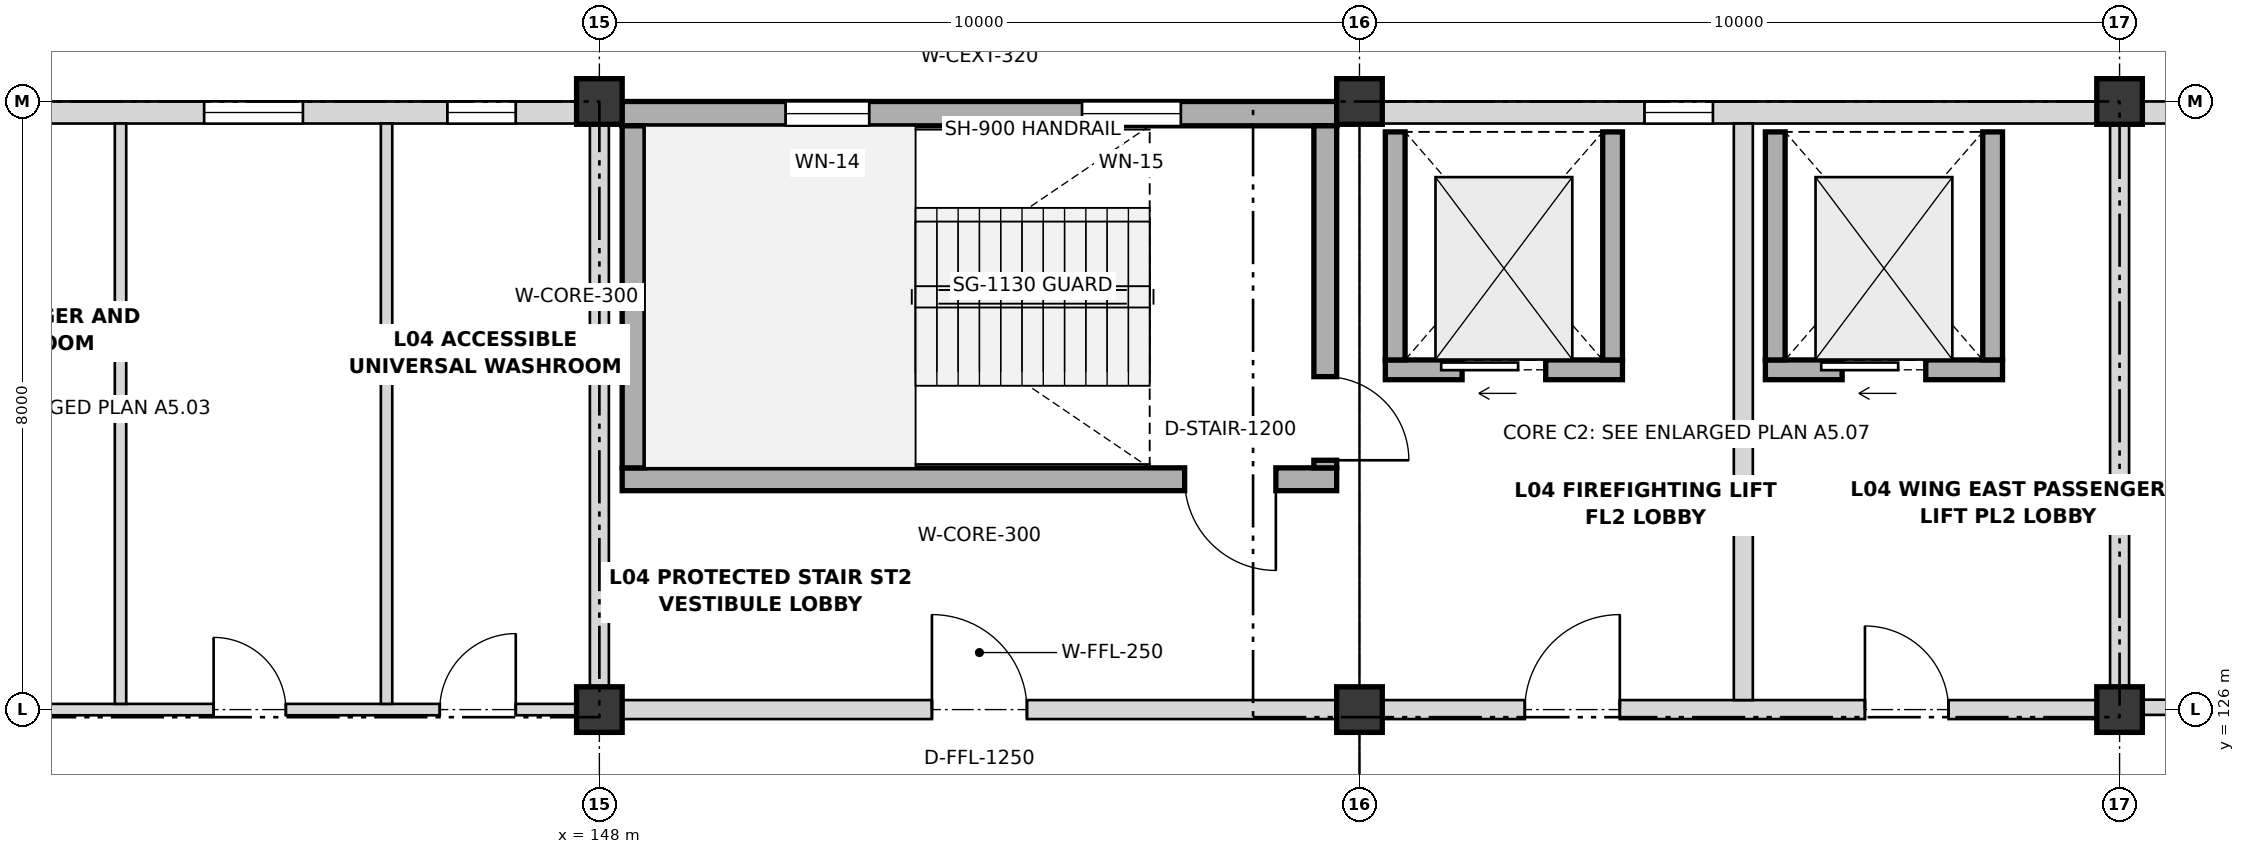
"""IFC4 building model, lengths in metres.
Left out: names, types, materials, properties, quantities, classifications, styles, units other than length and angle.
Written with IfcOpenShell. Run it as: python <this file> out.ifc"""

import sys

from ifc_helpers import new_model, si_unit, direction, frame, frame_2d, origin, origin_2d, place, context, subcontext, project, spatial, rectangle, extrude, element, fill, save


model = new_model("IFC4")
c1 = context("Model", 3, precision=1e-05, world=origin(), true_north=direction((0.0, 1.0)))
c2 = subcontext(c1, "Body", "Model", "MODEL_VIEW")
j1 = project(units=[si_unit("LENGTHUNIT", "METRE"), si_unit("PLANEANGLEUNIT", "RADIAN")], contexts=[c1])
p1 = place(None, origin())
s1 = spatial("IfcSite", under=j1, at=p1, CompositionType="ELEMENT")
p2 = place(p1, origin())
s2 = spatial("IfcBuilding", under=s1, at=p2, CompositionType="ELEMENT")
p3 = place(p2, frame((0.0, 0.0, 18.6)))
s3 = spatial("IfcBuildingStorey", under=s2, at=p3, CompositionType="ELEMENT", Elevation=18.6)
for number, where, z_axis, x_axis in (
    (1, (148.0, 126.0, 0.0), (0.0, 0.0, 1.0), (1.0, 0.0, 0.0)),
    (2, (148.0, 134.0, 0.0), (0.0, 0.0, 1.0), (1.0, 0.0, 0.0)),
    (3, (158.0, 126.0, 0.0), (0.0, 0.0, 1.0), (1.0, 0.0, 0.0)),
    (4, (158.0, 134.0, 0.0), (0.0, 0.0, 1.0), (1.0, 0.0, 0.0)),
    (5, (168.0, 126.0, 0.0), (0.0, 0.0, 1.0), (1.0, 0.0, 0.0)),
    (6, (168.0, 134.0, 0.0), (0.0, 0.0, 1.0), (1.0, 0.0, 0.0)),
):
    element("IfcColumn", number, at=place(p3, frame(where, z_axis=z_axis, x_axis=x_axis)), inside=s3, PredefinedType="COLUMN", context=c2, shape_type="SweptSolid", body=[
        extrude(rectangle(XDim=0.6, YDim=0.6, at=origin_2d()), origin(), (0.0, 0.0, 1.0), 4.2),
    ])
p4 = place(p3, frame((138.295, 133.855, 0.0), z_axis=(0.0, 0.0, 1.0), x_axis=(1.0, 0.0, 0.0)))
e7 = element("IfcWall", 7, at=p4, inside=s3, PredefinedType="SOLIDWALL", context=c2, shape_type="SweptSolid", body=[
    extrude(rectangle(XDim=9.41, YDim=0.29, at=frame_2d((4.705, 0.0))), origin(), (0.0, 0.0, 1.0), 3.188),
])
p5 = place(p4, frame((1.205, 0.0, 1.25)))
e8 = element("IfcOpeningElement", 8, at=p5, cuts=e7, PredefinedType="OPENING", context=c2, shape_type="SweptSolid", body=[
    extrude(rectangle(XDim=1.1, YDim=1.15, at=frame_2d((0.55, 0.575))), frame((0.0, 0.155, 0.0), z_axis=(0.0, -1.0, 0.0), x_axis=(1.0, 0.0, 0.0)), (0.0, 0.0, 1.0), 0.31),
])
p6 = place(p4, frame((4.505, 0.0, 1.25)))
e9 = element("IfcOpeningElement", 9, at=p6, cuts=e7, PredefinedType="OPENING", context=c2, shape_type="SweptSolid", body=[
    extrude(rectangle(XDim=1.3, YDim=1.15, at=frame_2d((0.65, 0.575))), frame((0.0, 0.155, 0.0), z_axis=(0.0, -1.0, 0.0), x_axis=(1.0, 0.0, 0.0)), (0.0, 0.0, 1.0), 0.31),
])
p7 = place(p4, frame((7.705, 0.0, 1.25)))
e10 = element("IfcOpeningElement", 10, at=p7, cuts=e7, PredefinedType="OPENING", context=c2, shape_type="SweptSolid", body=[
    extrude(rectangle(XDim=0.9, YDim=1.4, at=frame_2d((0.45, 0.7))), frame((0.0, 0.155, 0.0), z_axis=(0.0, -1.0, 0.0), x_axis=(1.0, 0.0, 0.0)), (0.0, 0.0, 1.0), 0.31),
])
p8 = place(p3, frame((148.295, 133.84, 0.0), z_axis=(0.0, 0.0, 1.0), x_axis=(1.0, 0.0, 0.0)))
e11 = element("IfcWall", 11, at=p8, inside=s3, PredefinedType="SHEAR", context=c2, shape_type="SweptSolid", body=[
    extrude(rectangle(XDim=9.41, YDim=0.32, at=frame_2d((4.705, 0.0))), origin(), (0.0, 0.0, 1.0), 4.2),
])
p9 = place(p8, frame((2.155, 0.0, 1.05)))
e12 = element("IfcOpeningElement", 12, at=p9, cuts=e11, PredefinedType="OPENING", context=c2, shape_type="SweptSolid", body=[
    extrude(rectangle(XDim=1.1, YDim=1.4, at=frame_2d((0.55, 0.7))), frame((0.0, 0.17, 0.0), z_axis=(0.0, -1.0, 0.0), x_axis=(1.0, 0.0, 0.0)), (0.0, 0.0, 1.0), 0.34),
])
p10 = place(p8, frame((6.055, 0.0, 1.05)))
e13 = element("IfcOpeningElement", 13, at=p10, cuts=e11, PredefinedType="OPENING", context=c2, shape_type="SweptSolid", body=[
    extrude(rectangle(XDim=1.3, YDim=1.4, at=frame_2d((0.65, 0.7))), frame((0.0, 0.17, 0.0), z_axis=(0.0, -1.0, 0.0), x_axis=(1.0, 0.0, 0.0)), (0.0, 0.0, 1.0), 0.34),
])
p11 = place(p3, frame((158.295, 133.855, 0.0), z_axis=(0.0, 0.0, 1.0), x_axis=(1.0, 0.0, 0.0)))
e14 = element("IfcWall", 14, at=p11, inside=s3, PredefinedType="SOLIDWALL", context=c2, shape_type="SweptSolid", body=[
    extrude(rectangle(XDim=9.41, YDim=0.29, at=frame_2d((4.705, 0.0))), origin(), (0.0, 0.0, 1.0), 3.188),
])
p12 = place(p11, frame((3.455, 0.0, 1.05)))
e15 = element("IfcOpeningElement", 15, at=p12, cuts=e14, PredefinedType="OPENING", context=c2, shape_type="SweptSolid", body=[
    extrude(rectangle(XDim=0.9, YDim=1.15, at=frame_2d((0.45, 0.575))), frame((0.0, 0.155, 0.0), z_axis=(0.0, -1.0, 0.0), x_axis=(1.0, 0.0, 0.0)), (0.0, 0.0, 1.0), 0.31),
])
p13 = place(p3, frame((168.295, 133.855, 0.0), z_axis=(0.0, 0.0, 1.0), x_axis=(1.0, 0.0, 0.0)))
e16 = element("IfcWall", 16, at=p13, inside=s3, PredefinedType="SOLIDWALL", context=c2, shape_type="SweptSolid", body=[
    extrude(rectangle(XDim=9.41, YDim=0.29, at=frame_2d((4.705, 0.0))), origin(), (0.0, 0.0, 1.0), 3.188),
])
p14 = place(p13, frame((1.855, 0.0, 1.05)))
e17 = element("IfcOpeningElement", 17, at=p14, cuts=e16, PredefinedType="OPENING", context=c2, shape_type="SweptSolid", body=[
    extrude(rectangle(XDim=1.1, YDim=1.15, at=frame_2d((0.55, 0.575))), frame((0.0, 0.155, 0.0), z_axis=(0.0, -1.0, 0.0), x_axis=(1.0, 0.0, 0.0)), (0.0, 0.0, 1.0), 0.31),
])
p15 = place(p13, frame((6.355, 0.0, 1.05)))
e18 = element("IfcOpeningElement", 18, at=p15, cuts=e16, PredefinedType="OPENING", context=c2, shape_type="SweptSolid", body=[
    extrude(rectangle(XDim=1.3, YDim=1.15, at=frame_2d((0.65, 0.575))), frame((0.0, 0.155, 0.0), z_axis=(0.0, -1.0, 0.0), x_axis=(1.0, 0.0, 0.0)), (0.0, 0.0, 1.0), 0.31),
])
p16 = place(p3, frame((157.7, 129.03, 0.0), z_axis=(0.0, 0.0, 1.0), x_axis=(-1.0, 0.0, 0.0)))
e19 = element("IfcWall", 19, at=p16, inside=s3, PredefinedType="SHEAR", context=c2, shape_type="SweptSolid", body=[
    extrude(rectangle(XDim=9.4, YDim=0.3, at=frame_2d((4.7, 0.0))), origin(), (0.0, 0.0, 1.0), 4.2),
])
p17 = place(p16, frame((0.8, 0.0, 0.0)))
e20 = element("IfcOpeningElement", 20, at=p17, cuts=e19, PredefinedType="OPENING", context=c2, shape_type="SweptSolid", body=[
    extrude(rectangle(XDim=1.2, YDim=2.15, at=frame_2d((0.6, 1.075))), frame((0.0, 0.16, 0.0), z_axis=(0.0, -1.0, 0.0), x_axis=(1.0, 0.0, 0.0)), (0.0, 0.0, 1.0), 0.32),
])
p18 = place(p3, frame((157.55, 133.68, 0.0), z_axis=(0.0, 0.0, 1.0), x_axis=(0.0, -1.0, 0.0)))
e21 = element("IfcWall", 21, at=p18, inside=s3, PredefinedType="SHEAR", context=c2, shape_type="SweptSolid", body=[
    extrude(rectangle(XDim=4.5, YDim=0.3, at=frame_2d((2.25, 0.0))), origin(), (0.0, 0.0, 1.0), 4.2),
])
p19 = place(p18, frame((3.3, 0.0, 0.0)))
e22 = element("IfcOpeningElement", 22, at=p19, cuts=e21, PredefinedType="OPENING", context=c2, shape_type="SweptSolid", body=[
    extrude(rectangle(XDim=1.1, YDim=2.15, at=frame_2d((0.55, 1.075))), frame((0.0, 0.16, 0.0), z_axis=(0.0, -1.0, 0.0), x_axis=(1.0, 0.0, 0.0)), (0.0, 0.0, 1.0), 0.32),
])
p20 = place(p3, frame((148.45, 129.18, 0.0), z_axis=(0.0, 0.0, 1.0), x_axis=(0.0, 1.0, 0.0)))
e23 = element("IfcWall", 23, at=p20, inside=s3, PredefinedType="SHEAR", context=c2, shape_type="SweptSolid", body=[
    extrude(rectangle(XDim=4.5, YDim=0.3, at=frame_2d((2.25, 0.0))), origin(), (0.0, 0.0, 1.0), 4.2),
])
p21 = place(p3, frame((158.34, 130.47, 0.0), z_axis=(0.0, 0.0, 1.0), x_axis=(1.0, 0.0, 0.0)))
e24 = element("IfcWall", 24, at=p21, inside=s3, PredefinedType="SHEAR", context=c2, shape_type="SweptSolid", body=[
    extrude(rectangle(XDim=3.12, YDim=0.26, at=frame_2d((1.56, 0.0))), origin(), (0.0, 0.0, 1.0), 4.2),
])
p22 = place(p21, frame((1.01, 0.0, 0.0)))
e25 = element("IfcOpeningElement", 25, at=p22, cuts=e24, PredefinedType="OPENING", context=c2, shape_type="SweptSolid", body=[
    extrude(rectangle(XDim=1.1, YDim=2.1, at=frame_2d((0.55, 1.05))), frame((0.0, 0.14, 0.0), z_axis=(0.0, -1.0, 0.0), x_axis=(1.0, 0.0, 0.0)), (0.0, 0.0, 1.0), 0.28),
])
for number, where, z_axis, x_axis in (
    (26, (158.47, 130.6, 0.0), (0.0, 0.0, 1.0), (0.0, 1.0, 0.0)),
    (27, (161.33, 130.6, 0.0), (0.0, 0.0, 1.0), (0.0, 1.0, 0.0)),
):
    element("IfcWall", number, at=place(p3, frame(where, z_axis=z_axis, x_axis=x_axis)), inside=s3, PredefinedType="SHEAR", context=c2, shape_type="SweptSolid", body=[
        extrude(rectangle(XDim=3.0, YDim=0.26, at=frame_2d((1.5, 0.0))), origin(), (0.0, 0.0, 1.0), 4.2),
    ])
p23 = place(p3, frame((163.34, 130.47, 0.0), z_axis=(0.0, 0.0, 1.0), x_axis=(1.0, 0.0, 0.0)))
e28 = element("IfcWall", 28, at=p23, inside=s3, PredefinedType="SHEAR", context=c2, shape_type="SweptSolid", body=[
    extrude(rectangle(XDim=3.12, YDim=0.26, at=frame_2d((1.56, 0.0))), origin(), (0.0, 0.0, 1.0), 4.2),
])
p24 = place(p23, frame((1.01, 0.0, 0.0)))
e29 = element("IfcOpeningElement", 29, at=p24, cuts=e28, PredefinedType="OPENING", context=c2, shape_type="SweptSolid", body=[
    extrude(rectangle(XDim=1.1, YDim=2.15, at=frame_2d((0.55, 1.075))), frame((0.0, 0.14, 0.0), z_axis=(0.0, -1.0, 0.0), x_axis=(1.0, 0.0, 0.0)), (0.0, 0.0, 1.0), 0.28),
])
for number, where, z_axis, x_axis in (
    (30, (163.47, 130.6, 0.0), (0.0, 0.0, 1.0), (0.0, 1.0, 0.0)),
    (31, (166.33, 130.6, 0.0), (0.0, 0.0, 1.0), (0.0, 1.0, 0.0)),
):
    element("IfcWall", number, at=place(p3, frame(where, z_axis=z_axis, x_axis=x_axis)), inside=s3, PredefinedType="SHEAR", context=c2, shape_type="SweptSolid", body=[
        extrude(rectangle(XDim=3.0, YDim=0.26, at=frame_2d((1.5, 0.0))), origin(), (0.0, 0.0, 1.0), 4.2),
    ])
p25 = place(p3, frame((138.305, 126.0, 0.0), z_axis=(0.0, 0.0, 1.0), x_axis=(1.0, 0.0, 0.0)))
e32 = element("IfcWall", 32, at=p25, inside=s3, PredefinedType="PARTITIONING", context=c2, shape_type="SweptSolid", body=[
    extrude(rectangle(XDim=9.39, YDim=0.15, at=frame_2d((4.695, 0.0))), origin(), (0.0, 0.0, 1.0), 3.188),
])
p26 = place(p25, frame((1.245, 0.0, 0.0)))
e33 = element("IfcOpeningElement", 33, at=p26, cuts=e32, PredefinedType="OPENING", context=c2, shape_type="SweptSolid", body=[
    extrude(rectangle(XDim=0.9, YDim=2.05, at=frame_2d((0.45, 1.025))), frame((0.0, 0.085, 0.0), z_axis=(0.0, -1.0, 0.0), x_axis=(1.0, 0.0, 0.0)), (0.0, 0.0, 1.0), 0.17),
])
p27 = place(p25, frame((4.62, 0.0, 0.0)))
e34 = element("IfcOpeningElement", 34, at=p27, cuts=e32, PredefinedType="OPENING", context=c2, shape_type="SweptSolid", body=[
    extrude(rectangle(XDim=0.95, YDim=2.05, at=frame_2d((0.475, 1.025))), frame((0.0, 0.085, 0.0), z_axis=(0.0, -1.0, 0.0), x_axis=(1.0, 0.0, 0.0)), (0.0, 0.0, 1.0), 0.17),
])
p28 = place(p25, frame((7.595, 0.0, 0.0)))
e35 = element("IfcOpeningElement", 35, at=p28, cuts=e32, PredefinedType="OPENING", context=c2, shape_type="SweptSolid", body=[
    extrude(rectangle(XDim=1.0, YDim=2.05, at=frame_2d((0.5, 1.025))), frame((0.0, 0.085, 0.0), z_axis=(0.0, -1.0, 0.0), x_axis=(1.0, 0.0, 0.0)), (0.0, 0.0, 1.0), 0.17),
])
p29 = place(p3, frame((148.305, 126.0, 0.0), z_axis=(0.0, 0.0, 1.0), x_axis=(1.0, 0.0, 0.0)))
e36 = element("IfcWall", 36, at=p29, inside=s3, PredefinedType="PARTITIONING", context=c2, shape_type="SweptSolid", body=[
    extrude(rectangle(XDim=9.39, YDim=0.25, at=frame_2d((4.695, 0.0))), origin(), (0.0, 0.0, 1.0), 3.188),
])
p30 = place(p29, frame((4.07, 0.0, 0.0)))
e37 = element("IfcOpeningElement", 37, at=p30, cuts=e36, PredefinedType="OPENING", context=c2, shape_type="SweptSolid", body=[
    extrude(rectangle(XDim=1.25, YDim=2.15, at=frame_2d((0.625, 1.075))), frame((0.0, 0.135, 0.0), z_axis=(0.0, -1.0, 0.0), x_axis=(1.0, 0.0, 0.0)), (0.0, 0.0, 1.0), 0.27),
])
p31 = place(p3, frame((158.305, 126.0, 0.0), z_axis=(0.0, 0.0, 1.0), x_axis=(1.0, 0.0, 0.0)))
e38 = element("IfcWall", 38, at=p31, inside=s3, PredefinedType="PARTITIONING", context=c2, shape_type="SweptSolid", body=[
    extrude(rectangle(XDim=9.39, YDim=0.25, at=frame_2d((4.695, 0.0))), origin(), (0.0, 0.0, 1.0), 3.188),
])
p32 = place(p31, frame((1.87, 0.0, 0.0)))
e39 = element("IfcOpeningElement", 39, at=p32, cuts=e38, PredefinedType="OPENING", context=c2, shape_type="SweptSolid", body=[
    extrude(rectangle(XDim=1.25, YDim=2.15, at=frame_2d((0.625, 1.075))), frame((0.0, 0.135, 0.0), z_axis=(0.0, -1.0, 0.0), x_axis=(1.0, 0.0, 0.0)), (0.0, 0.0, 1.0), 0.27),
])
p33 = place(p31, frame((6.345, 0.0, 0.0)))
e40 = element("IfcOpeningElement", 40, at=p33, cuts=e38, PredefinedType="OPENING", context=c2, shape_type="SweptSolid", body=[
    extrude(rectangle(XDim=1.1, YDim=2.15, at=frame_2d((0.55, 1.075))), frame((0.0, 0.135, 0.0), z_axis=(0.0, -1.0, 0.0), x_axis=(1.0, 0.0, 0.0)), (0.0, 0.0, 1.0), 0.27),
])
p34 = place(p3, frame((163.05, 126.125, 0.0), z_axis=(0.0, 0.0, 1.0), x_axis=(0.0, 1.0, 0.0)))
e41 = element("IfcWall", 41, at=p34, inside=s3, PredefinedType="PARTITIONING", context=c2, shape_type="SweptSolid", body=[
    extrude(rectangle(XDim=7.585, YDim=0.25, at=frame_2d((3.792, 0.0))), origin(), (0.0, 0.0, 1.0), 3.188),
])
for number, where, z_axis, x_axis in (
    (42, (141.7, 126.075, 0.0), (0.0, 0.0, 1.0), (0.0, 1.0, 0.0)),
    (43, (145.2, 126.075, 0.0), (0.0, 0.0, 1.0), (0.0, 1.0, 0.0)),
):
    element("IfcWall", number, at=place(p3, frame(where, z_axis=z_axis, x_axis=x_axis)), inside=s3, PredefinedType="PARTITIONING", context=c2, shape_type="SweptSolid", body=[
        extrude(rectangle(XDim=7.635, YDim=0.15, at=frame_2d((3.817, 0.0))), origin(), (0.0, 0.0, 1.0), 3.188),
    ])
for number, where, z_axis, x_axis in (
    (44, (148.0, 126.305, 0.0), (0.0, 0.0, 1.0), (0.0, 1.0, 0.0)),
    (45, (168.0, 126.305, 0.0), (0.0, 0.0, 1.0), (0.0, 1.0, 0.0)),
):
    element("IfcWall", number, at=place(p3, frame(where, z_axis=z_axis, x_axis=x_axis)), inside=s3, PredefinedType="PARTITIONING", context=c2, shape_type="SweptSolid", body=[
        extrude(rectangle(XDim=7.39, YDim=0.25, at=frame_2d((3.695, 0.0))), origin(), (0.0, 0.0, 1.0), 3.188),
    ])
p35 = place(p3, frame((168.3, 126.03, 0.0), z_axis=(0.0, 0.0, 1.0), x_axis=(1.0, 0.0, 0.0)))
e46 = element("IfcWall", 46, at=p35, inside=s3, PredefinedType="PARTITIONING", context=c2, shape_type="SweptSolid", body=[
    extrude(rectangle(XDim=9.4, YDim=0.2, at=frame_2d((4.7, 0.0))), origin(), (0.0, 0.0, 1.0), 3.188),
])
p36 = place(p35, frame((4.2, 0.0, 0.0)))
e47 = element("IfcOpeningElement", 47, at=p36, cuts=e46, PredefinedType="OPENING", context=c2, shape_type="SweptSolid", body=[
    extrude(rectangle(XDim=1.0, YDim=2.2, at=frame_2d((0.5, 1.1))), frame((0.0, 0.11, 0.0), z_axis=(0.0, -1.0, 0.0), x_axis=(1.0, 0.0, 0.0)), (0.0, 0.0, 1.0), 0.22),
])
p37 = place(p6, origin())
e48 = element("IfcWindow", 48, at=p37, inside=s3, PartitioningType="SINGLE_PANEL", PredefinedType="WINDOW", context=c2, shape_type="SweptSolid", body=[
    extrude(rectangle(XDim=1.3, YDim=1.15, at=frame_2d((0.65, 0.575))), frame((0.0, 0.03, 0.0), z_axis=(0.0, -1.0, 0.0), x_axis=(1.0, 0.0, 0.0)), (0.0, 0.0, 1.0), 0.06),
])
fill(e9, e48)
p38 = place(p7, origin())
e49 = element("IfcWindow", 49, at=p38, inside=s3, PartitioningType="SINGLE_PANEL", PredefinedType="WINDOW", context=c2, shape_type="SweptSolid", body=[
    extrude(rectangle(XDim=0.9, YDim=1.4, at=frame_2d((0.45, 0.7))), frame((0.0, 0.03, 0.0), z_axis=(0.0, -1.0, 0.0), x_axis=(1.0, 0.0, 0.0)), (0.0, 0.0, 1.0), 0.06),
])
fill(e10, e49)
p39 = place(p9, origin())
e50 = element("IfcWindow", 50, at=p39, inside=s3, PartitioningType="SINGLE_PANEL", PredefinedType="WINDOW", context=c2, shape_type="SweptSolid", body=[
    extrude(rectangle(XDim=1.1, YDim=1.4, at=frame_2d((0.55, 0.7))), frame((0.0, 0.03, 0.0), z_axis=(0.0, -1.0, 0.0), x_axis=(1.0, 0.0, 0.0)), (0.0, 0.0, 1.0), 0.06),
])
fill(e12, e50)
p40 = place(p10, origin())
e51 = element("IfcWindow", 51, at=p40, inside=s3, PartitioningType="SINGLE_PANEL", PredefinedType="WINDOW", context=c2, shape_type="SweptSolid", body=[
    extrude(rectangle(XDim=1.3, YDim=1.4, at=frame_2d((0.65, 0.7))), frame((0.0, 0.03, 0.0), z_axis=(0.0, -1.0, 0.0), x_axis=(1.0, 0.0, 0.0)), (0.0, 0.0, 1.0), 0.06),
])
fill(e13, e51)
p41 = place(p12, origin())
e52 = element("IfcWindow", 52, at=p41, inside=s3, PartitioningType="SINGLE_PANEL", PredefinedType="WINDOW", context=c2, shape_type="SweptSolid", body=[
    extrude(rectangle(XDim=0.9, YDim=1.15, at=frame_2d((0.45, 0.575))), frame((0.0, 0.03, 0.0), z_axis=(0.0, -1.0, 0.0), x_axis=(1.0, 0.0, 0.0)), (0.0, 0.0, 1.0), 0.06),
])
fill(e15, e52)
p42 = place(p17, origin())
e53 = element("IfcDoor", 53, at=p42, inside=s3, OperationType="SINGLE_SWING_LEFT", PredefinedType="DOOR", context=c2, shape_type="SweptSolid", body=[
    extrude(rectangle(XDim=1.2, YDim=2.15, at=frame_2d((0.6, 1.075))), frame((0.0, 0.025, 0.0), z_axis=(0.0, -1.0, 0.0), x_axis=(1.0, 0.0, 0.0)), (0.0, 0.0, 1.0), 0.05),
])
fill(e20, e53)
p43 = place(p19, origin())
e54 = element("IfcDoor", 54, at=p43, inside=s3, OperationType="SINGLE_SWING_RIGHT", PredefinedType="DOOR", context=c2, shape_type="SweptSolid", body=[
    extrude(rectangle(XDim=1.1, YDim=2.15, at=frame_2d((0.55, 1.075))), frame((0.0, 0.025, 0.0), z_axis=(0.0, -1.0, 0.0), x_axis=(1.0, 0.0, 0.0)), (0.0, 0.0, 1.0), 0.05),
])
fill(e22, e54)
p44 = place(p22, origin())
e55 = element("IfcDoor", 55, at=p44, inside=s3, OperationType="SLIDING_TO_LEFT", PredefinedType="DOOR", context=c2, shape_type="SweptSolid", body=[
    extrude(rectangle(XDim=1.1, YDim=2.1, at=frame_2d((0.55, 1.05))), frame((0.0, 0.025, 0.0), z_axis=(0.0, -1.0, 0.0), x_axis=(1.0, 0.0, 0.0)), (0.0, 0.0, 1.0), 0.05),
])
fill(e25, e55)
p45 = place(p24, origin())
e56 = element("IfcDoor", 56, at=p45, inside=s3, OperationType="SLIDING_TO_LEFT", PredefinedType="DOOR", context=c2, shape_type="SweptSolid", body=[
    extrude(rectangle(XDim=1.1, YDim=2.15, at=frame_2d((0.55, 1.075))), frame((0.0, 0.025, 0.0), z_axis=(0.0, -1.0, 0.0), x_axis=(1.0, 0.0, 0.0)), (0.0, 0.0, 1.0), 0.05),
])
fill(e29, e56)
p46 = place(p27, origin())
e57 = element("IfcDoor", 57, at=p46, inside=s3, OperationType="SINGLE_SWING_LEFT", PredefinedType="DOOR", context=c2, shape_type="SweptSolid", body=[
    extrude(rectangle(XDim=0.95, YDim=2.05, at=frame_2d((0.475, 1.025))), frame((0.0, 0.025, 0.0), z_axis=(0.0, -1.0, 0.0), x_axis=(1.0, 0.0, 0.0)), (0.0, 0.0, 1.0), 0.05),
])
fill(e34, e57)
p47 = place(p28, origin())
e58 = element("IfcDoor", 58, at=p47, inside=s3, OperationType="SINGLE_SWING_RIGHT", PredefinedType="DOOR", context=c2, shape_type="SweptSolid", body=[
    extrude(rectangle(XDim=1.0, YDim=2.05, at=frame_2d((0.5, 1.025))), frame((0.0, 0.025, 0.0), z_axis=(0.0, -1.0, 0.0), x_axis=(1.0, 0.0, 0.0)), (0.0, 0.0, 1.0), 0.05),
])
fill(e35, e58)
p48 = place(p30, origin())
e59 = element("IfcDoor", 59, at=p48, inside=s3, OperationType="SINGLE_SWING_LEFT", PredefinedType="DOOR", context=c2, shape_type="SweptSolid", body=[
    extrude(rectangle(XDim=1.25, YDim=2.15, at=frame_2d((0.625, 1.075))), frame((0.0, 0.025, 0.0), z_axis=(0.0, -1.0, 0.0), x_axis=(1.0, 0.0, 0.0)), (0.0, 0.0, 1.0), 0.05),
])
fill(e37, e59)
p49 = place(p32, origin())
e60 = element("IfcDoor", 60, at=p49, inside=s3, OperationType="SINGLE_SWING_RIGHT", PredefinedType="DOOR", context=c2, shape_type="SweptSolid", body=[
    extrude(rectangle(XDim=1.25, YDim=2.15, at=frame_2d((0.625, 1.075))), frame((0.0, 0.025, 0.0), z_axis=(0.0, -1.0, 0.0), x_axis=(1.0, 0.0, 0.0)), (0.0, 0.0, 1.0), 0.05),
])
fill(e39, e60)
p50 = place(p33, origin())
e61 = element("IfcDoor", 61, at=p50, inside=s3, OperationType="SINGLE_SWING_LEFT", PredefinedType="DOOR", context=c2, shape_type="SweptSolid", body=[
    extrude(rectangle(XDim=1.1, YDim=2.15, at=frame_2d((0.55, 1.075))), frame((0.0, 0.025, 0.0), z_axis=(0.0, -1.0, 0.0), x_axis=(1.0, 0.0, 0.0)), (0.0, 0.0, 1.0), 0.05),
])
fill(e40, e61)
save(model, sys.argv[1])
